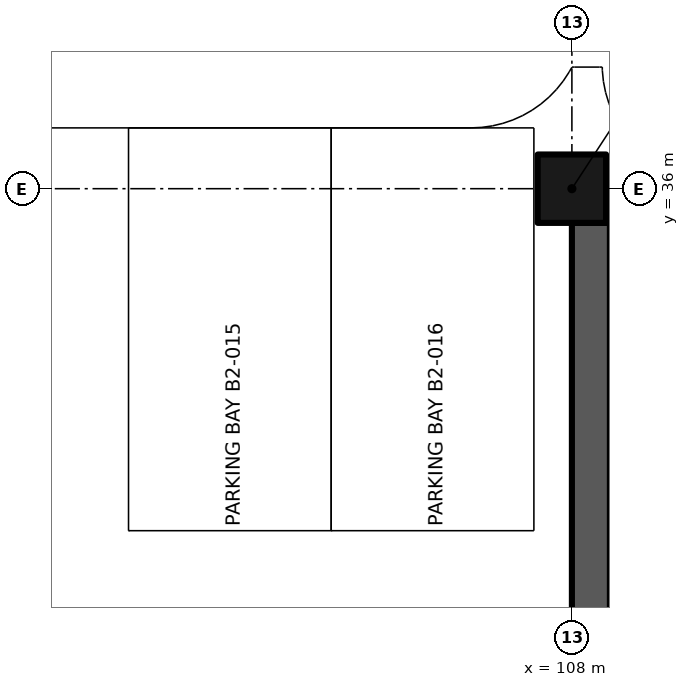
"""IFC4 building model, lengths in metres.
Left out: names, types, materials, properties, quantities, classifications, styles, units other than length and angle.
Written with IfcOpenShell. Run it as: python <this file> out.ifc"""

import sys

from ifc_helpers import new_model, si_unit, direction, frame, frame_2d, origin, origin_2d, place, context, subcontext, project, spatial, rectangle, extrude, element, save


model = new_model("IFC4")
c1 = context("Model", 3, precision=1e-05, world=origin(), true_north=direction((0.0, 1.0)))
c2 = subcontext(c1, "Body", "Model", "MODEL_VIEW")
j1 = project(units=[si_unit("LENGTHUNIT", "METRE"), si_unit("PLANEANGLEUNIT", "RADIAN")], contexts=[c1])
p1 = place(None, origin())
s1 = spatial("IfcSite", under=j1, at=p1, CompositionType="ELEMENT")
p2 = place(p1, origin())
s2 = spatial("IfcBuilding", under=s1, at=p2, CompositionType="ELEMENT")
p3 = place(p2, frame((0.0, 0.0, -9.9)))
s3 = spatial("IfcBuildingStorey", under=s2, at=p3, CompositionType="ELEMENT", Elevation=-9.9)
p4 = place(p3, frame((108.25, 27.45, -0.5), z_axis=(0.0, 0.0, 1.0), x_axis=(0.0, 1.0, 0.0)))
e1 = element("IfcWall", 1, at=p4, inside=s3, PredefinedType="SOLIDWALL", context=c2, shape_type="SweptSolid", body=[
    extrude(rectangle(XDim=8.1, YDim=0.5, at=frame_2d((4.05, 0.0))), origin(), (0.0, 0.0, 1.0), 5.3),
])
p5 = place(p3, frame((108.0, 36.0, 0.0), z_axis=(0.0, 0.0, 1.0), x_axis=(1.0, 0.0, 0.0)))
e2 = element("IfcColumn", 2, at=p5, inside=s3, PredefinedType="COLUMN", context=c2, shape_type="SweptSolid", body=[
    extrude(rectangle(XDim=0.9, YDim=0.9, at=origin_2d()), origin(), (0.0, 0.0, 1.0), 4.8),
])
save(model, sys.argv[1])
